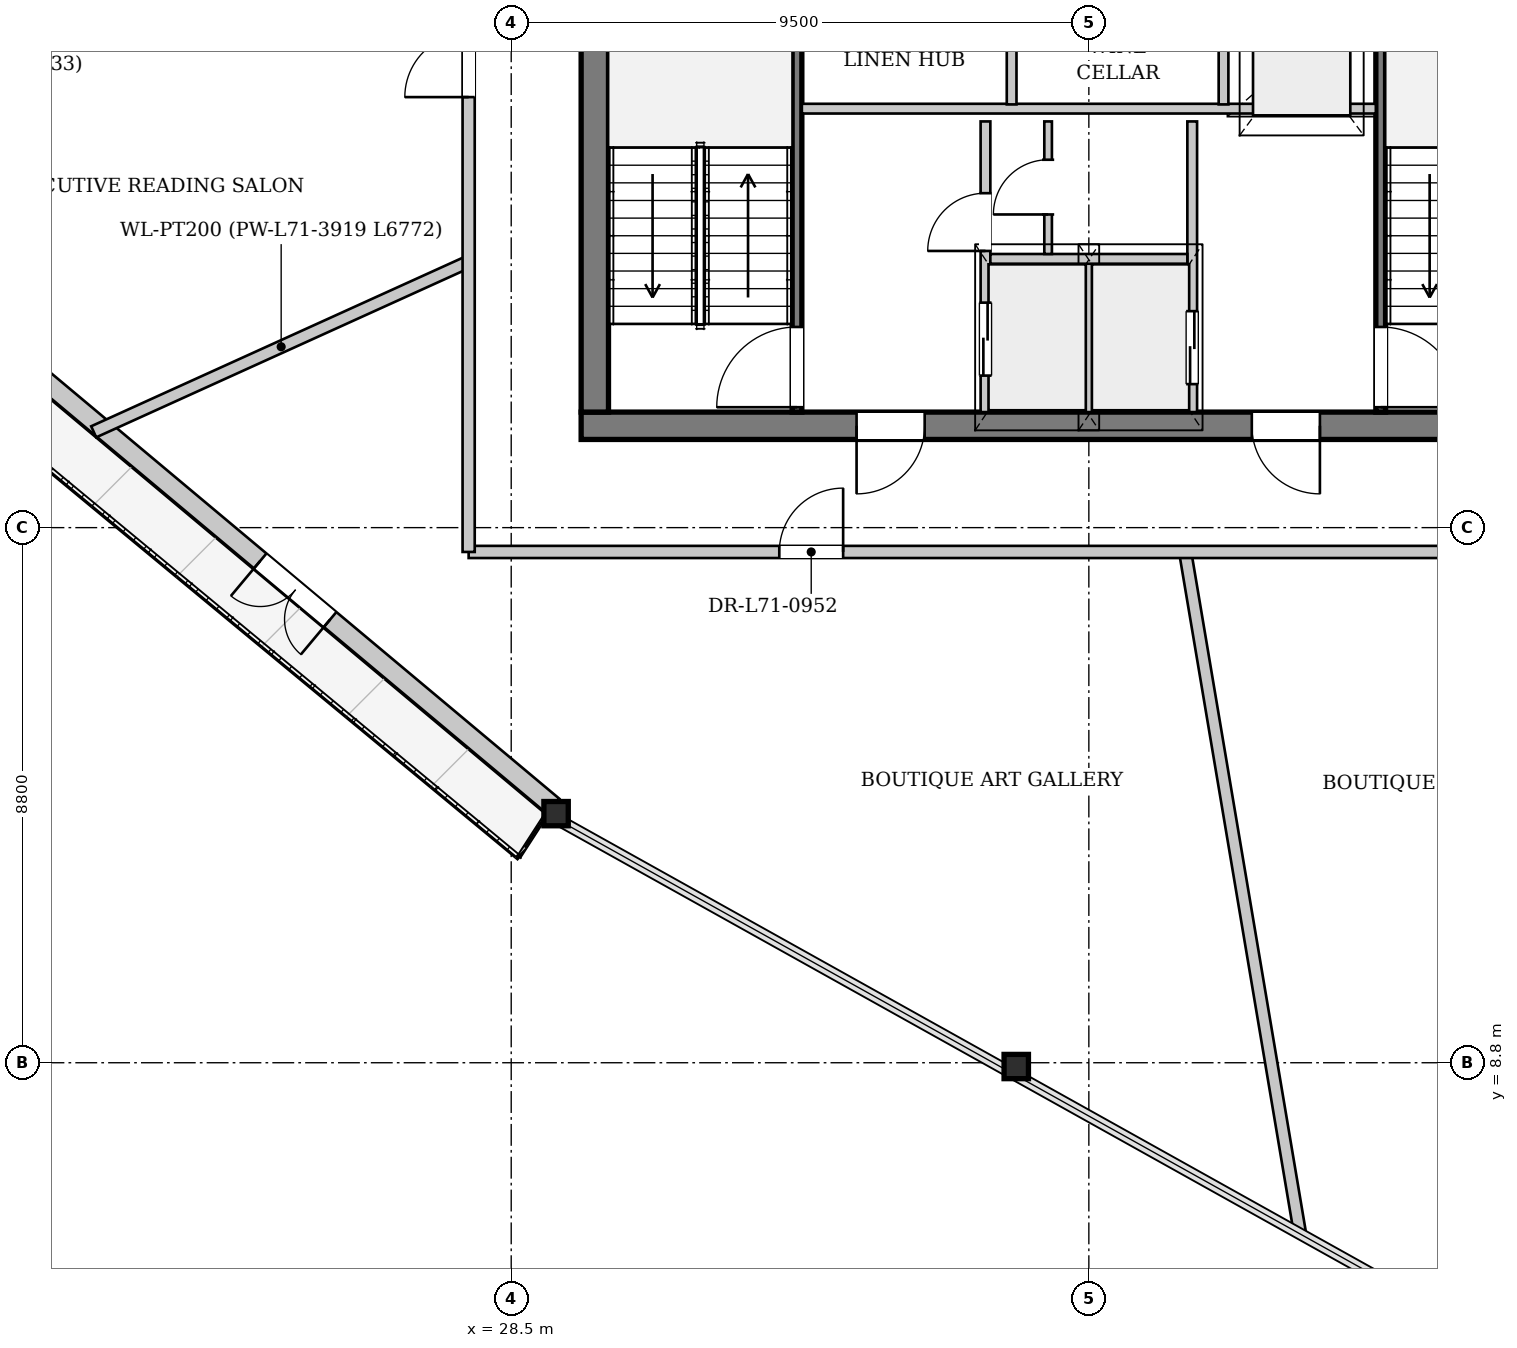
"""IFC4 building model, lengths in metres.
Left out: names, types, materials, properties, quantities, classifications, styles, units other than length and angle.
Written with IfcOpenShell. Run it as: python <this file> out.ifc"""

import sys

from ifc_helpers import new_model, si_unit, direction, frame, frame_2d, origin, origin_2d, place, context, subcontext, project, spatial, rectangle, i_section, extrude, source, transform, mapped, element, fill, save


model = new_model("IFC4")
c1 = context("Model", 3, precision=1e-05, world=origin(), true_north=direction((0.0, 1.0)))
c2 = subcontext(c1, "Body", "Model", "MODEL_VIEW")
j1 = project(units=[si_unit("LENGTHUNIT", "METRE"), si_unit("PLANEANGLEUNIT", "RADIAN")], contexts=[c1])
p1 = place(None, origin())
s1 = spatial("IfcSite", under=j1, at=p1, CompositionType="ELEMENT")
p2 = place(p1, origin())
s2 = spatial("IfcBuilding", under=s1, at=p2, CompositionType="ELEMENT")
p3 = place(p2, frame((0.0, 0.0, 266.9)))
s3 = spatial("IfcBuildingStorey", under=s2, at=p3, CompositionType="ELEMENT", Elevation=266.9)
m1 = source(origin(), c2, "Body", "SweptSolid", [
    extrude(i_section(OverallWidth=0.401, OverallDepth=0.399, WebThickness=0.022, FlangeThickness=0.034, at=origin_2d()), origin(), (0.0, 0.0, 1.0), 3.448),
])
p4 = place(p3, frame((29.086, 12.897, 0.0), z_axis=(0.088141745555, -0.000212389748, 0.996107919646), x_axis=(0.002409631559, 0.999997096834, 0.0)))
e1 = element("IfcColumn", 1, at=p4, inside=s3, PredefinedType="COLUMN", context=c2, shape_type="MappedRepresentation", body=[
    mapped(m1, transform((0.0, 0.0, 0.0), x_axis=(1.0, 0.0, 0.0), y_axis=(0.0, 1.0, 0.0), z_axis=(0.0, 0.0, 1.0), scale=1.0)),
])
m2 = source(origin(), c2, "Body", "SweptSolid", [
    extrude(i_section(OverallWidth=0.401, OverallDepth=0.399, WebThickness=0.022, FlangeThickness=0.034, at=origin_2d()), origin(), (0.0, 0.0, 1.0), 3.454),
])
p5 = place(p3, frame((36.634, 8.685, 0.0), z_axis=(0.099737899065, 0.03032427973, 0.994551551982), x_axis=(-0.290891784188, 0.956755961514, 0.0)))
e2 = element("IfcColumn", 2, at=p5, inside=s3, PredefinedType="COLUMN", context=c2, shape_type="MappedRepresentation", body=[
    mapped(m2, transform((0.0, 0.0, 0.0), x_axis=(1.0, 0.0, 0.0), y_axis=(0.0, 1.0, 0.0), z_axis=(0.0, 0.0, 1.0), scale=1.0)),
])
p6 = place(p3, frame((29.189, 13.02, 0.0), z_axis=(0.0, 0.0, 1.0), x_axis=(-0.76674910501, 0.641946890301, 0.0)))
e3 = element("IfcWall", 3, at=p6, inside=s3, PredefinedType="SOLIDWALL", context=c2, shape_type="SweptSolid", body=[
    extrude(rectangle(XDim=17.287, YDim=0.32, at=frame_2d((8.644, 0.0))), origin(), (0.0, 0.0, 1.0), 2.872),
])
p7 = place(p6, frame((4.782, 0.0, 0.0)))
e4 = element("IfcOpeningElement", 4, at=p7, cuts=e3, PredefinedType="OPENING", context=c2, shape_type="SweptSolid", body=[
    extrude(rectangle(XDim=1.5, YDim=2.3, at=frame_2d((0.75, 1.15))), frame((0.0, 0.17, 0.0), z_axis=(0.0, -1.0, 0.0), x_axis=(1.0, 0.0, 0.0)), (0.0, 0.0, 1.0), 0.34),
])
p8 = place(p6, frame((11.492, 0.0, 0.402)))
e5 = element("IfcOpeningElement", 5, at=p8, cuts=e3, PredefinedType="OPENING", context=c2, shape_type="SweptSolid", body=[
    extrude(rectangle(XDim=2.6, YDim=2.35, at=frame_2d((1.3, 1.175))), frame((0.0, 0.17, 0.0), z_axis=(0.0, -1.0, 0.0), x_axis=(1.0, 0.0, 0.0)), (0.0, 0.0, 1.0), 0.34),
])
p9 = place(p3, frame((46.35, 19.275, 0.0), z_axis=(0.0, 0.0, 1.0), x_axis=(-1.0, 0.0, 0.0)))
e6 = element("IfcWall", 6, at=p9, inside=s3, PredefinedType="SHEAR", context=c2, shape_type="SweptSolid", body=[
    extrude(rectangle(XDim=16.7, YDim=0.45, at=frame_2d((8.35, 0.0))), origin(), (0.0, 0.0, 1.0), 3.38),
])
p10 = place(p9, frame((4.55, 0.0, 0.0)))
e7 = element("IfcOpeningElement", 7, at=p10, cuts=e6, PredefinedType="OPENING", context=c2, shape_type="SweptSolid", body=[
    extrude(rectangle(XDim=1.12, YDim=2.25, at=frame_2d((0.56, 1.125))), frame((0.0, 0.235, 0.0), z_axis=(0.0, -1.0, 0.0), x_axis=(1.0, 0.0, 0.0)), (0.0, 0.0, 1.0), 0.47),
])
p11 = place(p9, frame((11.05, 0.0, 0.0)))
e8 = element("IfcOpeningElement", 8, at=p11, cuts=e6, PredefinedType="OPENING", context=c2, shape_type="SweptSolid", body=[
    extrude(rectangle(XDim=1.12, YDim=2.25, at=frame_2d((0.56, 1.125))), frame((0.0, 0.235, 0.0), z_axis=(0.0, -1.0, 0.0), x_axis=(1.0, 0.0, 0.0)), (0.0, 0.0, 1.0), 0.47),
])
p12 = place(p3, frame((29.875, 19.5, 0.0), z_axis=(0.0, 0.0, 1.0), x_axis=(0.0, 1.0, 0.0)))
e9 = element("IfcWall", 9, at=p12, inside=s3, PredefinedType="SHEAR", context=c2, shape_type="SweptSolid", body=[
    extrude(rectangle(XDim=14.2, YDim=0.45, at=frame_2d((7.1, 0.0))), origin(), (0.0, 0.0, 1.0), 3.38),
])
p13 = place(p12, frame((7.42, 0.0, 0.0)))
e10 = element("IfcOpeningElement", 10, at=p13, cuts=e9, PredefinedType="OPENING", context=c2, shape_type="SweptSolid", body=[
    extrude(rectangle(XDim=1.6, YDim=2.2, at=frame_2d((0.8, 1.1))), frame((0.0, 0.235, 0.0), z_axis=(0.0, -1.0, 0.0), x_axis=(1.0, 0.0, 0.0)), (0.0, 0.0, 1.0), 0.47),
])
p14 = place(p3, frame((33.2, 19.5, 0.0), z_axis=(0.0, 0.0, 1.0), x_axis=(0.0, 1.0, 0.0)))
e11 = element("IfcWall", 11, at=p14, inside=s3, PredefinedType="PARTITIONING", context=c2, shape_type="SweptSolid", body=[
    extrude(rectangle(XDim=7.46, YDim=0.16, at=frame_2d((3.73, 0.0))), origin(), (0.0, 0.0, 1.0), 3.38),
])
p15 = place(p14, frame((0.08, 0.0, 0.0)))
e12 = element("IfcOpeningElement", 12, at=p15, cuts=e11, PredefinedType="OPENING", context=c2, shape_type="SweptSolid", body=[
    extrude(rectangle(XDim=1.32, YDim=2.2, at=frame_2d((0.66, 1.1))), frame((0.0, 0.09, 0.0), z_axis=(0.0, -1.0, 0.0), x_axis=(1.0, 0.0, 0.0)), (0.0, 0.0, 1.0), 0.18),
])
p16 = place(p3, frame((42.8, 26.96, 0.0), z_axis=(0.0, 0.0, 1.0), x_axis=(0.0, -1.0, 0.0)))
e13 = element("IfcWall", 13, at=p16, inside=s3, PredefinedType="PARTITIONING", context=c2, shape_type="SweptSolid", body=[
    extrude(rectangle(XDim=7.46, YDim=0.16, at=frame_2d((3.73, 0.0))), origin(), (0.0, 0.0, 1.0), 3.38),
])
p17 = place(p16, frame((6.06, 0.0, 0.0)))
e14 = element("IfcOpeningElement", 14, at=p17, cuts=e13, PredefinedType="OPENING", context=c2, shape_type="SweptSolid", body=[
    extrude(rectangle(XDim=1.32, YDim=2.2, at=frame_2d((0.66, 1.1))), frame((0.0, 0.09, 0.0), z_axis=(0.0, -1.0, 0.0), x_axis=(1.0, 0.0, 0.0)), (0.0, 0.0, 1.0), 0.18),
])
p18 = place(p3, frame((36.3, 19.5, 0.0), z_axis=(0.0, 0.0, 1.0), x_axis=(0.0, 1.0, 0.0)))
e15 = element("IfcWall", 15, at=p18, inside=s3, PredefinedType="PARTITIONING", context=c2, shape_type="SweptSolid", body=[
    extrude(rectangle(XDim=4.78, YDim=0.16, at=frame_2d((2.39, 0.0))), origin(), (0.0, 0.0, 1.0), 3.38),
])
p19 = place(p18, frame((0.6, 0.0, 0.0)))
e16 = element("IfcOpeningElement", 16, at=p19, cuts=e15, PredefinedType="OPENING", context=c2, shape_type="SweptSolid", body=[
    extrude(rectangle(XDim=1.2, YDim=2.2, at=frame_2d((0.6, 1.1))), frame((0.0, 0.09, 0.0), z_axis=(0.0, -1.0, 0.0), x_axis=(1.0, 0.0, 0.0)), (0.0, 0.0, 1.0), 0.18),
])
p20 = place(p18, frame((2.65, 0.0, 0.0)))
e17 = element("IfcOpeningElement", 17, at=p20, cuts=e15, PredefinedType="OPENING", context=c2, shape_type="SweptSolid", body=[
    extrude(rectangle(XDim=0.95, YDim=2.1, at=frame_2d((0.475, 1.05))), frame((0.0, 0.09, 0.0), z_axis=(0.0, -1.0, 0.0), x_axis=(1.0, 0.0, 0.0)), (0.0, 0.0, 1.0), 0.18),
])
p21 = place(p3, frame((39.7, 24.28, 0.0), z_axis=(0.0, 0.0, 1.0), x_axis=(0.0, -1.0, 0.0)))
e18 = element("IfcWall", 18, at=p21, inside=s3, PredefinedType="PARTITIONING", context=c2, shape_type="SweptSolid", body=[
    extrude(rectangle(XDim=4.78, YDim=0.16, at=frame_2d((2.39, 0.0))), origin(), (0.0, 0.0, 1.0), 3.38),
])
p22 = place(p21, frame((3.12, 0.0, 0.0)))
e19 = element("IfcOpeningElement", 19, at=p22, cuts=e18, PredefinedType="OPENING", context=c2, shape_type="SweptSolid", body=[
    extrude(rectangle(XDim=1.2, YDim=2.2, at=frame_2d((0.6, 1.1))), frame((0.0, 0.09, 0.0), z_axis=(0.0, -1.0, 0.0), x_axis=(1.0, 0.0, 0.0)), (0.0, 0.0, 1.0), 0.18),
])
p23 = place(p3, frame((38.0, 19.5, 0.0), z_axis=(0.0, 0.0, 1.0), x_axis=(0.0, 1.0, 0.0)))
e20 = element("IfcWall", 20, at=p23, inside=s3, PredefinedType="PARTITIONING", context=c2, shape_type="SweptSolid", body=[
    extrude(rectangle(XDim=2.46, YDim=0.125, at=frame_2d((1.23, 0.0))), origin(), (0.0, 0.0, 1.0), 3.38),
])
p24 = place(p3, frame((36.38, 22.02, 0.0), z_axis=(0.0, 0.0, 1.0), x_axis=(1.0, 0.0, 0.0)))
e21 = element("IfcWall", 21, at=p24, inside=s3, PredefinedType="PARTITIONING", context=c2, shape_type="SweptSolid", body=[
    extrude(rectangle(XDim=3.24, YDim=0.16, at=frame_2d((1.62, 0.0))), origin(), (0.0, 0.0, 1.0), 3.38),
])
p25 = place(p3, frame((33.28, 24.49, 0.0), z_axis=(0.0, 0.0, 1.0), x_axis=(1.0, 0.0, 0.0)))
e22 = element("IfcWall", 22, at=p25, inside=s3, PredefinedType="PARTITIONING", context=c2, shape_type="SweptSolid", body=[
    extrude(rectangle(XDim=9.44, YDim=0.16, at=frame_2d((4.72, 0.0))), origin(), (0.0, 0.0, 1.0), 3.38),
])
p26 = place(p3, frame((37.33, 22.1, 0.0), z_axis=(0.0, 0.0, 1.0), x_axis=(0.0, 1.0, 0.0)))
e23 = element("IfcWall", 23, at=p26, inside=s3, PredefinedType="PARTITIONING", context=c2, shape_type="SweptSolid", body=[
    extrude(rectangle(XDim=2.18, YDim=0.125, at=frame_2d((1.09, 0.0))), origin(), (0.0, 0.0, 1.0), 3.38),
])
p27 = place(p26, frame((0.65, 0.0, 0.0)))
e24 = element("IfcOpeningElement", 24, at=p27, cuts=e23, PredefinedType="OPENING", context=c2, shape_type="SweptSolid", body=[
    extrude(rectangle(XDim=0.9, YDim=2.1, at=frame_2d((0.45, 1.05))), frame((0.0, 0.073, 0.0), z_axis=(0.0, -1.0, 0.0), x_axis=(1.0, 0.0, 0.0)), (0.0, 0.0, 1.0), 0.145),
])
for number, where, z_axis, x_axis in (
    (25, (36.73, 24.56, 0.0), (0.0, 0.0, 1.0), (0.0, 1.0, 0.0)),
    (26, (40.215, 24.56, 0.0), (0.0, 0.0, 1.0), (0.0, 1.0, 0.0)),
):
    element("IfcWall", number, at=place(p3, frame(where, z_axis=z_axis, x_axis=x_axis)), inside=s3, PredefinedType="PARTITIONING", context=c2, shape_type="SweptSolid", body=[
        extrude(rectangle(XDim=2.31, YDim=0.16, at=frame_2d((1.155, 0.0))), origin(), (0.0, 0.0, 1.0), 3.38),
    ])
p28 = place(p3, frame((27.8, 21.973, 0.0), z_axis=(0.0, 0.0, 1.0), x_axis=(-0.910683532828, -0.41310471195, 0.0)))
e27 = element("IfcWall", 27, at=p28, inside=s3, PredefinedType="PARTITIONING", context=c2, shape_type="SweptSolid", body=[
    extrude(rectangle(XDim=6.771, YDim=0.2, at=frame_2d((3.386, 0.0))), origin(), (0.0, 0.0, 1.0), 3.38),
])
p29 = place(p3, frame((39.584, 17.2, 0.0), z_axis=(0.0, 0.0, 1.0), x_axis=(0.166152121506, -0.98610013311, 0.0)))
e28 = element("IfcWall", 28, at=p29, inside=s3, PredefinedType="PARTITIONING", context=c2, shape_type="SweptSolid", body=[
    extrude(rectangle(XDim=11.335, YDim=0.2, at=frame_2d((5.667, 0.0))), origin(), (0.0, 0.0, 1.0), 3.38),
])
p30 = place(p3, frame((27.8, 17.2, 0.0), z_axis=(0.0, 0.0, 1.0), x_axis=(1.0, 0.0, 0.0)))
e29 = element("IfcWall", 29, at=p30, inside=s3, PredefinedType="PARTITIONING", context=c2, shape_type="SweptSolid", body=[
    extrude(rectangle(XDim=20.4, YDim=0.2, at=frame_2d((10.2, 0.0))), origin(), (0.0, 0.0, 1.0), 3.38),
])
p31 = place(p30, frame((5.109, 0.0, 0.0)))
e30 = element("IfcOpeningElement", 30, at=p31, cuts=e29, PredefinedType="OPENING", context=c2, shape_type="SweptSolid", body=[
    extrude(rectangle(XDim=1.05, YDim=2.2, at=frame_2d((0.525, 1.1))), frame((0.0, 0.11, 0.0), z_axis=(0.0, -1.0, 0.0), x_axis=(1.0, 0.0, 0.0)), (0.0, 0.0, 1.0), 0.22),
])
p32 = place(p3, frame((27.8, 17.2, 0.0), z_axis=(0.0, 0.0, 1.0), x_axis=(0.0, 1.0, 0.0)))
e31 = element("IfcWall", 31, at=p32, inside=s3, PredefinedType="PARTITIONING", context=c2, shape_type="SweptSolid", body=[
    extrude(rectangle(XDim=18.33, YDim=0.2, at=frame_2d((9.165, 0.0))), origin(), (0.0, 0.0, 1.0), 3.38),
])
p33 = place(p32, frame((14.787, 0.0, 0.0)))
e32 = element("IfcOpeningElement", 32, at=p33, cuts=e31, PredefinedType="OPENING", context=c2, shape_type="SweptSolid", body=[
    extrude(rectangle(XDim=1.05, YDim=2.2, at=frame_2d((0.525, 1.1))), frame((0.0, 0.11, 0.0), z_axis=(0.0, -1.0, 0.0), x_axis=(1.0, 0.0, 0.0)), (0.0, 0.0, 1.0), 0.22),
])
p34 = place(p32, frame((7.48, 0.0, 0.0)))
e33 = element("IfcOpeningElement", 33, at=p34, cuts=e31, PredefinedType="OPENING", context=c2, shape_type="SweptSolid", body=[
    extrude(rectangle(XDim=1.05, YDim=2.2, at=frame_2d((0.525, 1.1))), frame((0.0, 0.11, 0.0), z_axis=(0.0, -1.0, 0.0), x_axis=(1.0, 0.0, 0.0)), (0.0, 0.0, 1.0), 0.22),
])
m3 = source(origin(), c2, "Body", "SweptSolid", [
    extrude(rectangle(XDim=1.5, YDim=2.3, at=frame_2d((0.75, 1.15))), frame((0.0, 0.025, 0.0), z_axis=(0.0, -1.0, 0.0), x_axis=(1.0, 0.0, 0.0)), (0.0, 0.0, 1.0), 0.05),
])
p35 = place(p7, origin())
e34 = element("IfcDoor", 34, at=p35, inside=s3, OperationType="DOUBLE_DOOR_SINGLE_SWING", PredefinedType="DOOR", context=c2, shape_type="MappedRepresentation", body=[
    mapped(m3, transform((0.0, 0.0, 0.0), x_axis=(1.0, 0.0, 0.0), y_axis=(0.0, 1.0, 0.0), z_axis=(0.0, 0.0, 1.0), scale=1.0)),
])
fill(e4, e34)
m4 = source(origin(), c2, "Body", "SweptSolid", [
    extrude(rectangle(XDim=1.12, YDim=2.25, at=frame_2d((0.56, 1.125))), frame((0.0, 0.025, 0.0), z_axis=(0.0, -1.0, 0.0), x_axis=(1.0, 0.0, 0.0)), (0.0, 0.0, 1.0), 0.05),
])
p36 = place(p10, origin())
e35 = element("IfcDoor", 35, at=p36, inside=s3, OperationType="SINGLE_SWING_LEFT", PredefinedType="DOOR", context=c2, shape_type="MappedRepresentation", body=[
    mapped(m4, transform((0.0, 0.0, 0.0), x_axis=(1.0, 0.0, 0.0), y_axis=(0.0, 1.0, 0.0), z_axis=(0.0, 0.0, 1.0), scale=1.0)),
])
fill(e7, e35)
p37 = place(p11, origin())
e36 = element("IfcDoor", 36, at=p37, inside=s3, OperationType="SINGLE_SWING_RIGHT", PredefinedType="DOOR", context=c2, shape_type="MappedRepresentation", body=[
    mapped(m4, transform((0.0, 0.0, 0.0), x_axis=(1.0, 0.0, 0.0), y_axis=(0.0, 1.0, 0.0), z_axis=(0.0, 0.0, 1.0), scale=1.0)),
])
fill(e8, e36)
m5 = source(origin(), c2, "Body", "SweptSolid", [
    extrude(rectangle(XDim=1.32, YDim=2.2, at=frame_2d((0.66, 1.1))), frame((0.0, 0.025, 0.0), z_axis=(0.0, -1.0, 0.0), x_axis=(1.0, 0.0, 0.0)), (0.0, 0.0, 1.0), 0.05),
])
p38 = place(p15, origin())
e37 = element("IfcDoor", 37, at=p38, inside=s3, OperationType="SINGLE_SWING_LEFT", PredefinedType="DOOR", context=c2, shape_type="MappedRepresentation", body=[
    mapped(m5, transform((0.0, 0.0, 0.0), x_axis=(1.0, 0.0, 0.0), y_axis=(0.0, 1.0, 0.0), z_axis=(0.0, 0.0, 1.0), scale=1.0)),
])
fill(e12, e37)
p39 = place(p17, origin())
e38 = element("IfcDoor", 38, at=p39, inside=s3, OperationType="SINGLE_SWING_RIGHT", PredefinedType="DOOR", context=c2, shape_type="MappedRepresentation", body=[
    mapped(m5, transform((0.0, 0.0, 0.0), x_axis=(1.0, 0.0, 0.0), y_axis=(0.0, 1.0, 0.0), z_axis=(0.0, 0.0, 1.0), scale=1.0)),
])
fill(e14, e38)
m6 = source(origin(), c2, "Body", "SweptSolid", [
    extrude(rectangle(XDim=1.2, YDim=2.2, at=frame_2d((0.6, 1.1))), frame((0.0, 0.025, 0.0), z_axis=(0.0, -1.0, 0.0), x_axis=(1.0, 0.0, 0.0)), (0.0, 0.0, 1.0), 0.05),
])
p40 = place(p19, origin())
e39 = element("IfcDoor", 39, at=p40, inside=s3, OperationType="DOUBLE_DOOR_SLIDING", PredefinedType="DOOR", context=c2, shape_type="MappedRepresentation", body=[
    mapped(m6, transform((0.0, 0.0, 0.0), x_axis=(1.0, 0.0, 0.0), y_axis=(0.0, 1.0, 0.0), z_axis=(0.0, 0.0, 1.0), scale=1.0)),
])
fill(e16, e39)
m7 = source(origin(), c2, "Body", "SweptSolid", [
    extrude(rectangle(XDim=0.95, YDim=2.1, at=frame_2d((0.475, 1.05))), frame((0.0, 0.025, 0.0), z_axis=(0.0, -1.0, 0.0), x_axis=(1.0, 0.0, 0.0)), (0.0, 0.0, 1.0), 0.05),
])
p41 = place(p20, origin())
e40 = element("IfcDoor", 40, at=p41, inside=s3, OperationType="SINGLE_SWING_LEFT", PredefinedType="DOOR", context=c2, shape_type="MappedRepresentation", body=[
    mapped(m7, transform((0.0, 0.0, 0.0), x_axis=(1.0, 0.0, 0.0), y_axis=(0.0, 1.0, 0.0), z_axis=(0.0, 0.0, 1.0), scale=1.0)),
])
fill(e17, e40)
m8 = source(origin(), c2, "Body", "SweptSolid", [
    extrude(rectangle(XDim=0.9, YDim=2.1, at=frame_2d((0.45, 1.05))), frame((0.0, 0.025, 0.0), z_axis=(0.0, -1.0, 0.0), x_axis=(1.0, 0.0, 0.0)), (0.0, 0.0, 1.0), 0.05),
])
p42 = place(p27, origin())
e41 = element("IfcDoor", 41, at=p42, inside=s3, OperationType="SINGLE_SWING_LEFT", PredefinedType="DOOR", context=c2, shape_type="MappedRepresentation", body=[
    mapped(m8, transform((0.0, 0.0, 0.0), x_axis=(1.0, 0.0, 0.0), y_axis=(0.0, 1.0, 0.0), z_axis=(0.0, 0.0, 1.0), scale=1.0)),
])
fill(e24, e41)
p43 = place(p22, origin())
e42 = element("IfcDoor", 42, at=p43, inside=s3, OperationType="DOUBLE_DOOR_SLIDING", PredefinedType="DOOR", context=c2, shape_type="MappedRepresentation", body=[
    mapped(m6, transform((0.0, 0.0, 0.0), x_axis=(1.0, 0.0, 0.0), y_axis=(0.0, 1.0, 0.0), z_axis=(0.0, 0.0, 1.0), scale=1.0)),
])
fill(e19, e42)
m9 = source(origin(), c2, "Body", "SweptSolid", [
    extrude(rectangle(XDim=1.05, YDim=2.2, at=frame_2d((0.525, 1.1))), frame((0.0, 0.025, 0.0), z_axis=(0.0, -1.0, 0.0), x_axis=(1.0, 0.0, 0.0)), (0.0, 0.0, 1.0), 0.05),
])
p44 = place(p31, origin())
e43 = element("IfcDoor", 43, at=p44, inside=s3, OperationType="SINGLE_SWING_RIGHT", PredefinedType="DOOR", context=c2, shape_type="MappedRepresentation", body=[
    mapped(m9, transform((0.0, 0.0, 0.0), x_axis=(1.0, 0.0, 0.0), y_axis=(0.0, 1.0, 0.0), z_axis=(0.0, 0.0, 1.0), scale=1.0)),
])
fill(e30, e43)
p45 = place(p34, origin())
e44 = element("IfcDoor", 44, at=p45, inside=s3, OperationType="SINGLE_SWING_LEFT", PredefinedType="DOOR", context=c2, shape_type="MappedRepresentation", body=[
    mapped(m9, transform((0.0, 0.0, 0.0), x_axis=(1.0, 0.0, 0.0), y_axis=(0.0, 1.0, 0.0), z_axis=(0.0, 0.0, 1.0), scale=1.0)),
])
fill(e33, e44)
save(model, sys.argv[1])
